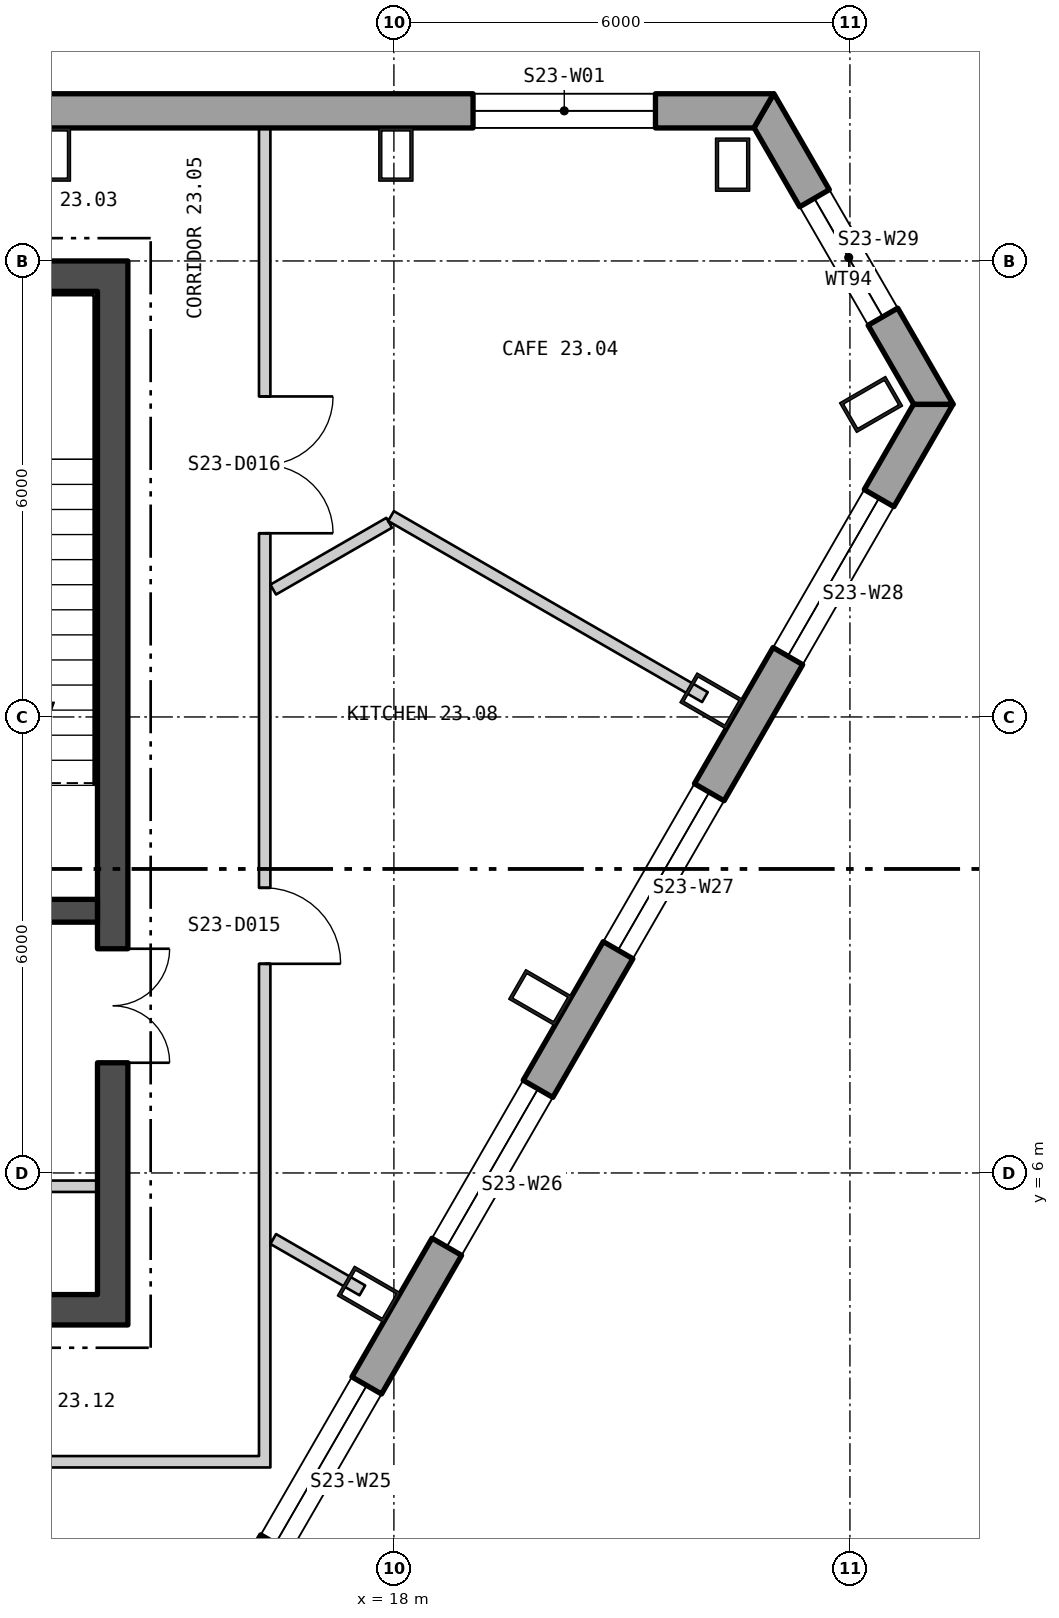
"""IFC4 building model, lengths in metres.
Left out: names, types, materials, properties, quantities, classifications, styles, units other than length and angle.
Written with IfcOpenShell. Run it as: python <this file> out.ifc"""

import sys

from ifc_helpers import new_model, si_unit, direction, frame, frame_2d, origin, origin_2d, place, context, subcontext, project, spatial, polyline, rectangle, hollow_rectangle, outline, extrude, element, fill, save


model = new_model("IFC4")
c1 = context("Model", 3, precision=1e-05, world=origin(), true_north=direction((0.0, 1.0)))
c2 = subcontext(c1, "Body", "Model", "MODEL_VIEW")
j1 = project(units=[si_unit("LENGTHUNIT", "METRE"), si_unit("PLANEANGLEUNIT", "RADIAN")], contexts=[c1])
p1 = place(None, origin())
s1 = spatial("IfcSite", under=j1, at=p1, CompositionType="ELEMENT")
p2 = place(p1, origin())
s2 = spatial("IfcBuilding", under=s1, at=p2, CompositionType="ELEMENT")
p3 = place(p2, frame((0.0, 0.0, 304.2)))
s3 = spatial("IfcBuildingStorey", under=s2, at=p3, CompositionType="ELEMENT", Elevation=304.2)
for number, where, z_axis, x_axis in (
    (1, (22.456, 19.267, 0.0), (0.0, 0.0, 1.0), (-1.0, 0.0, 0.0)),
    (2, (18.026, 19.4, 0.0), (0.0, 0.0, 1.0), (-1.0, 0.0, 0.0)),
    (3, (13.52, 19.4, 0.0), (0.0, 0.0, 1.0), (-1.0, 0.0, 0.0)),
    (4, (17.671, 4.404, 0.0), (0.0, 0.0, 1.0), (0.5, 0.866, 0.0)),
    (5, (19.925, 8.307, 0.0), (0.0, 0.0, 1.0), (0.5, 0.866, 0.0)),
    (6, (22.178, 12.21, 0.0), (0.0, 0.0, 1.0), (0.5, 0.866, 0.0)),
    (7, (24.278, 16.112, 0.0), (0.0, 0.0, 1.0), (-0.5, 0.866, 0.0)),
):
    element("IfcColumn", number, at=place(p3, frame(where, z_axis=z_axis, x_axis=x_axis)), inside=s3, PredefinedType="COLUMN", context=c2, shape_type="SweptSolid", body=[
        extrude(hollow_rectangle(XDim=0.45, YDim=0.7, WallThickness=0.04, at=origin_2d()), origin(), (0.0, 0.0, 1.0), 4.2),
    ])
p4 = place(p3, frame((22.865, 19.975, -0.4), z_axis=(0.0, 0.0, 1.0), x_axis=(-1.0, 0.0, 0.0)))
e8 = element("IfcWall", 8, at=p4, inside=s3, PredefinedType="SOLIDWALL", context=c2, shape_type="SweptSolid", body=[
    extrude(outline(polyline([(-0.13, -0.225), (45.86, -0.225), (45.6, 0.225), (0.13, 0.225), (-0.13, -0.225)])), origin(), (0.0, 0.0, 1.0), 4.2),
])
p5 = place(p4, frame((1.424, 0.0, 1.3)))
e9 = element("IfcOpeningElement", 9, at=p5, cuts=e8, PredefinedType="OPENING", context=c2, shape_type="SweptSolid", body=[
    extrude(rectangle(XDim=2.4, YDim=2.3, at=frame_2d((1.2, 1.15))), frame((0.0, 0.235, 0.0), z_axis=(0.0, -1.0, 0.0), x_axis=(1.0, 0.0, 0.0)), (0.0, 0.0, 1.0), 0.47),
])
p6 = place(p4, frame((14.905, 0.0, 1.3)))
e10 = element("IfcOpeningElement", 10, at=p6, cuts=e8, PredefinedType="OPENING", context=c2, shape_type="SweptSolid", body=[
    extrude(rectangle(XDim=2.4, YDim=2.3, at=frame_2d((1.2, 1.15))), frame((0.0, 0.235, 0.0), z_axis=(0.0, -1.0, 0.0), x_axis=(1.0, 0.0, 0.0)), (0.0, 0.0, 1.0), 0.47),
])
p7 = place(p4, frame((19.412, 0.0, 1.3)))
e11 = element("IfcOpeningElement", 11, at=p7, cuts=e8, PredefinedType="OPENING", context=c2, shape_type="SweptSolid", body=[
    extrude(rectangle(XDim=2.4, YDim=2.3, at=frame_2d((1.2, 1.15))), frame((0.0, 0.235, 0.0), z_axis=(0.0, -1.0, 0.0), x_axis=(1.0, 0.0, 0.0)), (0.0, 0.0, 1.0), 0.47),
])
p8 = place(p4, frame((23.918, 0.0, 1.3)))
e12 = element("IfcOpeningElement", 12, at=p8, cuts=e8, PredefinedType="OPENING", context=c2, shape_type="SweptSolid", body=[
    extrude(rectangle(XDim=2.4, YDim=2.3, at=frame_2d((1.2, 1.15))), frame((0.0, 0.235, 0.0), z_axis=(0.0, -1.0, 0.0), x_axis=(1.0, 0.0, 0.0)), (0.0, 0.0, 1.0), 0.47),
])
p9 = place(p4, frame((28.425, 0.0, 1.3)))
e13 = element("IfcOpeningElement", 13, at=p9, cuts=e8, PredefinedType="OPENING", context=c2, shape_type="SweptSolid", body=[
    extrude(rectangle(XDim=2.4, YDim=2.3, at=frame_2d((1.2, 1.15))), frame((0.0, 0.235, 0.0), z_axis=(0.0, -1.0, 0.0), x_axis=(1.0, 0.0, 0.0)), (0.0, 0.0, 1.0), 0.47),
])
p10 = place(p4, frame((32.932, 0.0, 1.3)))
e14 = element("IfcOpeningElement", 14, at=p10, cuts=e8, PredefinedType="OPENING", context=c2, shape_type="SweptSolid", body=[
    extrude(rectangle(XDim=2.4, YDim=2.3, at=frame_2d((1.2, 1.15))), frame((0.0, 0.235, 0.0), z_axis=(0.0, -1.0, 0.0), x_axis=(1.0, 0.0, 0.0)), (0.0, 0.0, 1.0), 0.47),
])
p11 = place(p4, frame((41.907, 0.0, 1.3)))
e15 = element("IfcOpeningElement", 15, at=p11, cuts=e8, PredefinedType="OPENING", context=c2, shape_type="SweptSolid", body=[
    extrude(rectangle(XDim=2.4, YDim=2.3, at=frame_2d((1.2, 1.15))), frame((0.0, 0.235, 0.0), z_axis=(0.0, -1.0, 0.0), x_axis=(1.0, 0.0, 0.0)), (0.0, 0.0, 1.0), 0.47),
])
p12 = place(p3, frame((2.23, -23.491, -0.18), z_axis=(0.0, 0.0, 1.0), x_axis=(0.500000141277, 0.866025322218, 0.0)))
e16 = element("IfcWall", 16, at=p12, inside=s3, PredefinedType="SOLIDWALL", context=c2, shape_type="SweptSolid", body=[
    extrude(outline(polyline([(-0.13, -0.225), (45.86, -0.225), (45.6, 0.225), (0.13, 0.225), (-0.13, -0.225)])), origin(), (0.0, 0.0, 1.0), 3.98),
])
p13 = place(p12, frame((1.424, 0.0, 1.08)))
e17 = element("IfcOpeningElement", 17, at=p13, cuts=e16, PredefinedType="OPENING", context=c2, shape_type="SweptSolid", body=[
    extrude(rectangle(XDim=2.4, YDim=2.3, at=frame_2d((1.2, 1.15))), frame((0.0, 0.235, 0.0), z_axis=(0.0, -1.0, 0.0), x_axis=(1.0, 0.0, 0.0)), (0.0, 0.0, 1.0), 0.47),
])
p14 = place(p12, frame((5.892, 0.0, 1.08)))
e18 = element("IfcOpeningElement", 18, at=p14, cuts=e16, PredefinedType="OPENING", context=c2, shape_type="SweptSolid", body=[
    extrude(rectangle(XDim=2.4, YDim=2.3, at=frame_2d((1.2, 1.15))), frame((0.0, 0.235, 0.0), z_axis=(0.0, -1.0, 0.0), x_axis=(1.0, 0.0, 0.0)), (0.0, 0.0, 1.0), 0.47),
])
p15 = place(p12, frame((10.399, 0.0, 1.08)))
e19 = element("IfcOpeningElement", 19, at=p15, cuts=e16, PredefinedType="OPENING", context=c2, shape_type="SweptSolid", body=[
    extrude(rectangle(XDim=2.4, YDim=2.3, at=frame_2d((1.2, 1.15))), frame((0.0, 0.235, 0.0), z_axis=(0.0, -1.0, 0.0), x_axis=(1.0, 0.0, 0.0)), (0.0, 0.0, 1.0), 0.47),
])
p16 = place(p12, frame((14.905, 0.0, 1.08)))
e20 = element("IfcOpeningElement", 20, at=p16, cuts=e16, PredefinedType="OPENING", context=c2, shape_type="SweptSolid", body=[
    extrude(rectangle(XDim=2.4, YDim=2.3, at=frame_2d((1.2, 1.15))), frame((0.0, 0.235, 0.0), z_axis=(0.0, -1.0, 0.0), x_axis=(1.0, 0.0, 0.0)), (0.0, 0.0, 1.0), 0.47),
])
p17 = place(p12, frame((19.412, 0.0, 1.08)))
e21 = element("IfcOpeningElement", 21, at=p17, cuts=e16, PredefinedType="OPENING", context=c2, shape_type="SweptSolid", body=[
    extrude(rectangle(XDim=2.4, YDim=2.3, at=frame_2d((1.2, 1.15))), frame((0.0, 0.235, 0.0), z_axis=(0.0, -1.0, 0.0), x_axis=(1.0, 0.0, 0.0)), (0.0, 0.0, 1.0), 0.47),
])
p18 = place(p12, frame((23.918, 0.0, 1.08)))
e22 = element("IfcOpeningElement", 22, at=p18, cuts=e16, PredefinedType="OPENING", context=c2, shape_type="SweptSolid", body=[
    extrude(rectangle(XDim=2.4, YDim=2.3, at=frame_2d((1.2, 1.15))), frame((0.0, 0.235, 0.0), z_axis=(0.0, -1.0, 0.0), x_axis=(1.0, 0.0, 0.0)), (0.0, 0.0, 1.0), 0.47),
])
p19 = place(p12, frame((28.425, 0.0, 1.08)))
e23 = element("IfcOpeningElement", 23, at=p19, cuts=e16, PredefinedType="OPENING", context=c2, shape_type="SweptSolid", body=[
    extrude(rectangle(XDim=2.4, YDim=2.3, at=frame_2d((1.2, 1.15))), frame((0.0, 0.235, 0.0), z_axis=(0.0, -1.0, 0.0), x_axis=(1.0, 0.0, 0.0)), (0.0, 0.0, 1.0), 0.47),
])
p20 = place(p12, frame((32.932, 0.0, 1.08)))
e24 = element("IfcOpeningElement", 24, at=p20, cuts=e16, PredefinedType="OPENING", context=c2, shape_type="SweptSolid", body=[
    extrude(rectangle(XDim=2.4, YDim=2.3, at=frame_2d((1.2, 1.15))), frame((0.0, 0.235, 0.0), z_axis=(0.0, -1.0, 0.0), x_axis=(1.0, 0.0, 0.0)), (0.0, 0.0, 1.0), 0.47),
])
p21 = place(p12, frame((37.438, 0.0, 1.08)))
e25 = element("IfcOpeningElement", 25, at=p21, cuts=e16, PredefinedType="OPENING", context=c2, shape_type="SweptSolid", body=[
    extrude(rectangle(XDim=2.4, YDim=2.3, at=frame_2d((1.2, 1.15))), frame((0.0, 0.235, 0.0), z_axis=(0.0, -1.0, 0.0), x_axis=(1.0, 0.0, 0.0)), (0.0, 0.0, 1.0), 0.47),
])
p22 = place(p12, frame((41.907, 0.0, 1.08)))
e26 = element("IfcOpeningElement", 26, at=p22, cuts=e16, PredefinedType="OPENING", context=c2, shape_type="SweptSolid", body=[
    extrude(rectangle(XDim=2.4, YDim=2.3, at=frame_2d((1.2, 1.15))), frame((0.0, 0.235, 0.0), z_axis=(0.0, -1.0, 0.0), x_axis=(1.0, 0.0, 0.0)), (0.0, 0.0, 1.0), 0.47),
])
p23 = place(p3, frame((25.099, 16.114, -0.4), z_axis=(0.0, 0.0, 1.0), x_axis=(-0.499994806646, 0.866028402148, 0.0)))
e27 = element("IfcWall", 27, at=p23, inside=s3, PredefinedType="SOLIDWALL", context=c2, shape_type="SweptSolid", body=[
    extrude(outline(polyline([(-0.13, -0.225), (4.59, -0.225), (4.33, 0.225), (0.13, 0.225), (-0.13, -0.225)])), origin(), (0.0, 0.0, 1.0), 4.2),
])
p24 = place(p23, frame((1.33, 0.0, 1.3)))
e28 = element("IfcOpeningElement", 28, at=p24, cuts=e27, PredefinedType="OPENING", context=c2, shape_type="SweptSolid", body=[
    extrude(rectangle(XDim=1.8, YDim=2.3, at=frame_2d((0.9, 1.15))), frame((0.0, 0.235, 0.0), z_axis=(0.0, -1.0, 0.0), x_axis=(1.0, 0.0, 0.0)), (0.0, 0.0, 1.0), 0.47),
])
p25 = place(p3, frame((-14.5, 4.2, 0.0), z_axis=(0.0, 0.0, 1.0), x_axis=(1.0, 0.0, 0.0)))
e29 = element("IfcWall", 29, at=p25, inside=s3, PredefinedType="SHEAR", context=c2, shape_type="SweptSolid", body=[
    extrude(rectangle(XDim=29.0, YDim=0.4, at=frame_2d((14.5, 0.0))), origin(), (0.0, 0.0, 1.0), 4.0),
])
p26 = place(p25, frame((9.0, 0.0, 0.0)))
e30 = element("IfcOpeningElement", 30, at=p26, cuts=e29, PredefinedType="OPENING", context=c2, shape_type="SweptSolid", body=[
    extrude(rectangle(XDim=1.8, YDim=2.4, at=frame_2d((0.9, 1.2))), frame((0.0, 0.21, 0.0), z_axis=(0.0, -1.0, 0.0), x_axis=(1.0, 0.0, 0.0)), (0.0, 0.0, 1.0), 0.42),
])
p27 = place(p25, frame((19.0, 0.0, 0.0)))
e31 = element("IfcOpeningElement", 31, at=p27, cuts=e29, PredefinedType="OPENING", context=c2, shape_type="SweptSolid", body=[
    extrude(rectangle(XDim=1.8, YDim=2.4, at=frame_2d((0.9, 1.2))), frame((0.0, 0.21, 0.0), z_axis=(0.0, -1.0, 0.0), x_axis=(1.0, 0.0, 0.0)), (0.0, 0.0, 1.0), 0.42),
])
p28 = place(p3, frame((-14.5, 17.8, 0.0), z_axis=(0.0, 0.0, 1.0), x_axis=(1.0, 0.0, 0.0)))
e32 = element("IfcWall", 32, at=p28, inside=s3, PredefinedType="SHEAR", context=c2, shape_type="SweptSolid", body=[
    extrude(rectangle(XDim=29.0, YDim=0.4, at=frame_2d((14.5, 0.0))), origin(), (0.0, 0.0, 1.0), 4.0),
])
p29 = place(p3, frame((14.3, 4.4, 0.0), z_axis=(0.0, 0.0, 1.0), x_axis=(0.0, 1.0, 0.0)))
e33 = element("IfcWall", 33, at=p29, inside=s3, PredefinedType="SHEAR", context=c2, shape_type="SweptSolid", body=[
    extrude(rectangle(XDim=13.2, YDim=0.4, at=frame_2d((6.6, 0.0))), origin(), (0.0, 0.0, 1.0), 4.0),
])
p30 = place(p29, frame((3.05, 0.0, 0.0)))
e34 = element("IfcOpeningElement", 34, at=p30, cuts=e33, PredefinedType="OPENING", context=c2, shape_type="SweptSolid", body=[
    extrude(rectangle(XDim=1.5, YDim=2.1, at=frame_2d((0.75, 1.05))), frame((0.0, 0.21, 0.0), z_axis=(0.0, -1.0, 0.0), x_axis=(1.0, 0.0, 0.0)), (0.0, 0.0, 1.0), 0.42),
])
p31 = place(p3, frame((11.0, 9.45, 0.0), z_axis=(0.0, 0.0, 1.0), x_axis=(1.0, 0.0, 0.0)))
e35 = element("IfcWall", 35, at=p31, inside=s3, PredefinedType="SHEAR", context=c2, shape_type="SweptSolid", body=[
    extrude(rectangle(XDim=3.1, YDim=0.3, at=frame_2d((1.55, 0.0))), origin(), (0.0, 0.0, 1.0), 4.0),
])
p32 = place(p31, frame((0.95, 0.0, 0.0)))
e36 = element("IfcOpeningElement", 36, at=p32, cuts=e35, PredefinedType="OPENING", context=c2, shape_type="SweptSolid", body=[
    extrude(rectangle(XDim=1.2, YDim=2.1, at=frame_2d((0.6, 1.05))), frame((0.0, 0.16, 0.0), z_axis=(0.0, -1.0, 0.0), x_axis=(1.0, 0.0, 0.0)), (0.0, 0.0, 1.0), 0.32),
])
p33 = place(p3, frame((11.0, 5.825, 0.0), z_axis=(0.0, 0.0, 1.0), x_axis=(1.0, 0.0, 0.0)))
e37 = element("IfcWall", 37, at=p33, inside=s3, PredefinedType="PARTITIONING", context=c2, shape_type="SweptSolid", body=[
    extrude(rectangle(XDim=3.1, YDim=0.15, at=frame_2d((1.55, 0.0))), origin(), (0.0, 0.0, 1.0), 4.0),
])
p34 = place(p3, frame((7.655, 2.2, 0.0), z_axis=(0.0, 0.0, 1.0), x_axis=(1.0, 0.0, 0.0)))
e38 = element("IfcWall", 38, at=p34, inside=s3, PredefinedType="PARTITIONING", context=c2, shape_type="SweptSolid", body=[
    extrude(rectangle(XDim=8.57, YDim=0.15, at=frame_2d((4.285, 0.0))), origin(), (0.0, 0.0, 1.0), 4.0),
])
p35 = place(p34, frame((3.334, 0.0, 0.0)))
e39 = element("IfcOpeningElement", 39, at=p35, cuts=e38, PredefinedType="OPENING", context=c2, shape_type="SweptSolid", body=[
    extrude(rectangle(XDim=1.8, YDim=2.1, at=frame_2d((0.9, 1.05))), frame((0.0, 0.085, 0.0), z_axis=(0.0, -1.0, 0.0), x_axis=(1.0, 0.0, 0.0)), (0.0, 0.0, 1.0), 0.17),
])
p36 = place(p3, frame((16.3, 2.125, 0.0), z_axis=(0.0, 0.0, 1.0), x_axis=(0.0, 1.0, 0.0)))
e40 = element("IfcWall", 40, at=p36, inside=s3, PredefinedType="PARTITIONING", context=c2, shape_type="SweptSolid", body=[
    extrude(rectangle(XDim=17.623, YDim=0.15, at=frame_2d((8.812, 0.0))), origin(), (0.0, 0.0, 1.0), 4.0),
])
p37 = place(p36, frame((6.627, 0.0, 0.0)))
e41 = element("IfcOpeningElement", 41, at=p37, cuts=e40, PredefinedType="OPENING", context=c2, shape_type="SweptSolid", body=[
    extrude(rectangle(XDim=1.0, YDim=2.1, at=frame_2d((0.5, 1.05))), frame((0.0, 0.085, 0.0), z_axis=(0.0, -1.0, 0.0), x_axis=(1.0, 0.0, 0.0)), (0.0, 0.0, 1.0), 0.17),
])
p38 = place(p36, frame((12.292, 0.0, 0.0)))
e42 = element("IfcOpeningElement", 42, at=p38, cuts=e40, PredefinedType="OPENING", context=c2, shape_type="SweptSolid", body=[
    extrude(rectangle(XDim=1.8, YDim=2.1, at=frame_2d((0.9, 1.05))), frame((0.0, 0.085, 0.0), z_axis=(0.0, -1.0, 0.0), x_axis=(1.0, 0.0, 0.0)), (0.0, 0.0, 1.0), 0.17),
])
p39 = place(p3, frame((16.412, 13.676, 0.0), z_axis=(0.0, 0.0, 1.0), x_axis=(0.866525711774, 0.499132438171, 0.0)))
e43 = element("IfcWall", 43, at=p39, inside=s3, PredefinedType="PARTITIONING", context=c2, shape_type="SweptSolid", body=[
    extrude(rectangle(XDim=1.761, YDim=0.15, at=frame_2d((0.881, 0.0))), origin(), (0.0, 0.0, 1.0), 4.0),
])
p40 = place(p3, frame((16.412, 5.131, 0.0), z_axis=(0.0, 0.0, 1.0), x_axis=(0.866419132933, -0.499317420173, 0.0)))
e44 = element("IfcWall", 44, at=p40, inside=s3, PredefinedType="PARTITIONING", context=c2, shape_type="SweptSolid", body=[
    extrude(rectangle(XDim=1.354, YDim=0.15, at=frame_2d((0.677, 0.0))), origin(), (0.0, 0.0, 1.0), 4.0),
])
p41 = place(p3, frame((17.962, 14.643, 0.0), z_axis=(0.0, 0.0, 1.0), x_axis=(0.866248432975, -0.499613502989, 0.0)))
e45 = element("IfcWall", 45, at=p41, inside=s3, PredefinedType="PARTITIONING", context=c2, shape_type="SweptSolid", body=[
    extrude(rectangle(XDim=4.768, YDim=0.15, at=frame_2d((2.384, 0.0))), origin(), (0.0, 0.0, 1.0), 4.0),
])
p42 = place(p5, origin())
e46 = element("IfcWindow", 46, at=p42, inside=s3, PartitioningType="SINGLE_PANEL", PredefinedType="WINDOW", context=c2, shape_type="SweptSolid", body=[
    extrude(rectangle(XDim=2.4, YDim=2.3, at=frame_2d((1.2, 1.15))), frame((0.0, 0.105, 0.0), z_axis=(0.0, -1.0, 0.0), x_axis=(1.0, 0.0, 0.0)), (0.0, 0.0, 1.0), 0.06),
])
fill(e9, e46)
p43 = place(p19, origin())
e47 = element("IfcWindow", 47, at=p43, inside=s3, PartitioningType="SINGLE_PANEL", PredefinedType="WINDOW", context=c2, shape_type="SweptSolid", body=[
    extrude(rectangle(XDim=2.4, YDim=2.3, at=frame_2d((1.2, 1.15))), frame((0.0, 0.105, 0.0), z_axis=(0.0, -1.0, 0.0), x_axis=(1.0, 0.0, 0.0)), (0.0, 0.0, 1.0), 0.06),
])
fill(e23, e47)
p44 = place(p20, origin())
e48 = element("IfcWindow", 48, at=p44, inside=s3, PartitioningType="SINGLE_PANEL", PredefinedType="WINDOW", context=c2, shape_type="SweptSolid", body=[
    extrude(rectangle(XDim=2.4, YDim=2.3, at=frame_2d((1.2, 1.15))), frame((0.0, 0.105, 0.0), z_axis=(0.0, -1.0, 0.0), x_axis=(1.0, 0.0, 0.0)), (0.0, 0.0, 1.0), 0.06),
])
fill(e24, e48)
p45 = place(p21, origin())
e49 = element("IfcWindow", 49, at=p45, inside=s3, PartitioningType="SINGLE_PANEL", PredefinedType="WINDOW", context=c2, shape_type="SweptSolid", body=[
    extrude(rectangle(XDim=2.4, YDim=2.3, at=frame_2d((1.2, 1.15))), frame((0.0, 0.105, 0.0), z_axis=(0.0, -1.0, 0.0), x_axis=(1.0, 0.0, 0.0)), (0.0, 0.0, 1.0), 0.06),
])
fill(e25, e49)
p46 = place(p22, origin())
e50 = element("IfcWindow", 50, at=p46, inside=s3, PartitioningType="SINGLE_PANEL", PredefinedType="WINDOW", context=c2, shape_type="SweptSolid", body=[
    extrude(rectangle(XDim=2.4, YDim=2.3, at=frame_2d((1.2, 1.15))), frame((0.0, 0.105, 0.0), z_axis=(0.0, -1.0, 0.0), x_axis=(1.0, 0.0, 0.0)), (0.0, 0.0, 1.0), 0.06),
])
fill(e26, e50)
p47 = place(p24, origin())
e51 = element("IfcWindow", 51, at=p47, inside=s3, PartitioningType="SINGLE_PANEL", PredefinedType="WINDOW", context=c2, shape_type="SweptSolid", body=[
    extrude(rectangle(XDim=1.8, YDim=2.3, at=frame_2d((0.9, 1.15))), frame((0.0, 0.105, 0.0), z_axis=(0.0, -1.0, 0.0), x_axis=(1.0, 0.0, 0.0)), (0.0, 0.0, 1.0), 0.06),
])
fill(e28, e51)
p48 = place(p30, origin())
e52 = element("IfcDoor", 52, at=p48, inside=s3, OperationType="DOUBLE_DOOR_SINGLE_SWING", PredefinedType="DOOR", context=c2, shape_type="SweptSolid", body=[
    extrude(rectangle(XDim=1.5, YDim=2.1, at=frame_2d((0.75, 1.05))), frame((0.0, 0.025, 0.0), z_axis=(0.0, -1.0, 0.0), x_axis=(1.0, 0.0, 0.0)), (0.0, 0.0, 1.0), 0.05),
])
fill(e34, e52)
p49 = place(p37, origin())
e53 = element("IfcDoor", 53, at=p49, inside=s3, OperationType="SINGLE_SWING_LEFT", PredefinedType="DOOR", context=c2, shape_type="SweptSolid", body=[
    extrude(rectangle(XDim=1.0, YDim=2.1, at=frame_2d((0.5, 1.05))), frame((0.0, 0.025, 0.0), z_axis=(0.0, -1.0, 0.0), x_axis=(1.0, 0.0, 0.0)), (0.0, 0.0, 1.0), 0.05),
])
fill(e41, e53)
p50 = place(p38, origin())
e54 = element("IfcDoor", 54, at=p50, inside=s3, OperationType="DOUBLE_DOOR_SINGLE_SWING", PredefinedType="DOOR", context=c2, shape_type="SweptSolid", body=[
    extrude(rectangle(XDim=1.8, YDim=2.1, at=frame_2d((0.9, 1.05))), frame((0.0, 0.025, 0.0), z_axis=(0.0, -1.0, 0.0), x_axis=(1.0, 0.0, 0.0)), (0.0, 0.0, 1.0), 0.05),
])
fill(e42, e54)
save(model, sys.argv[1])
